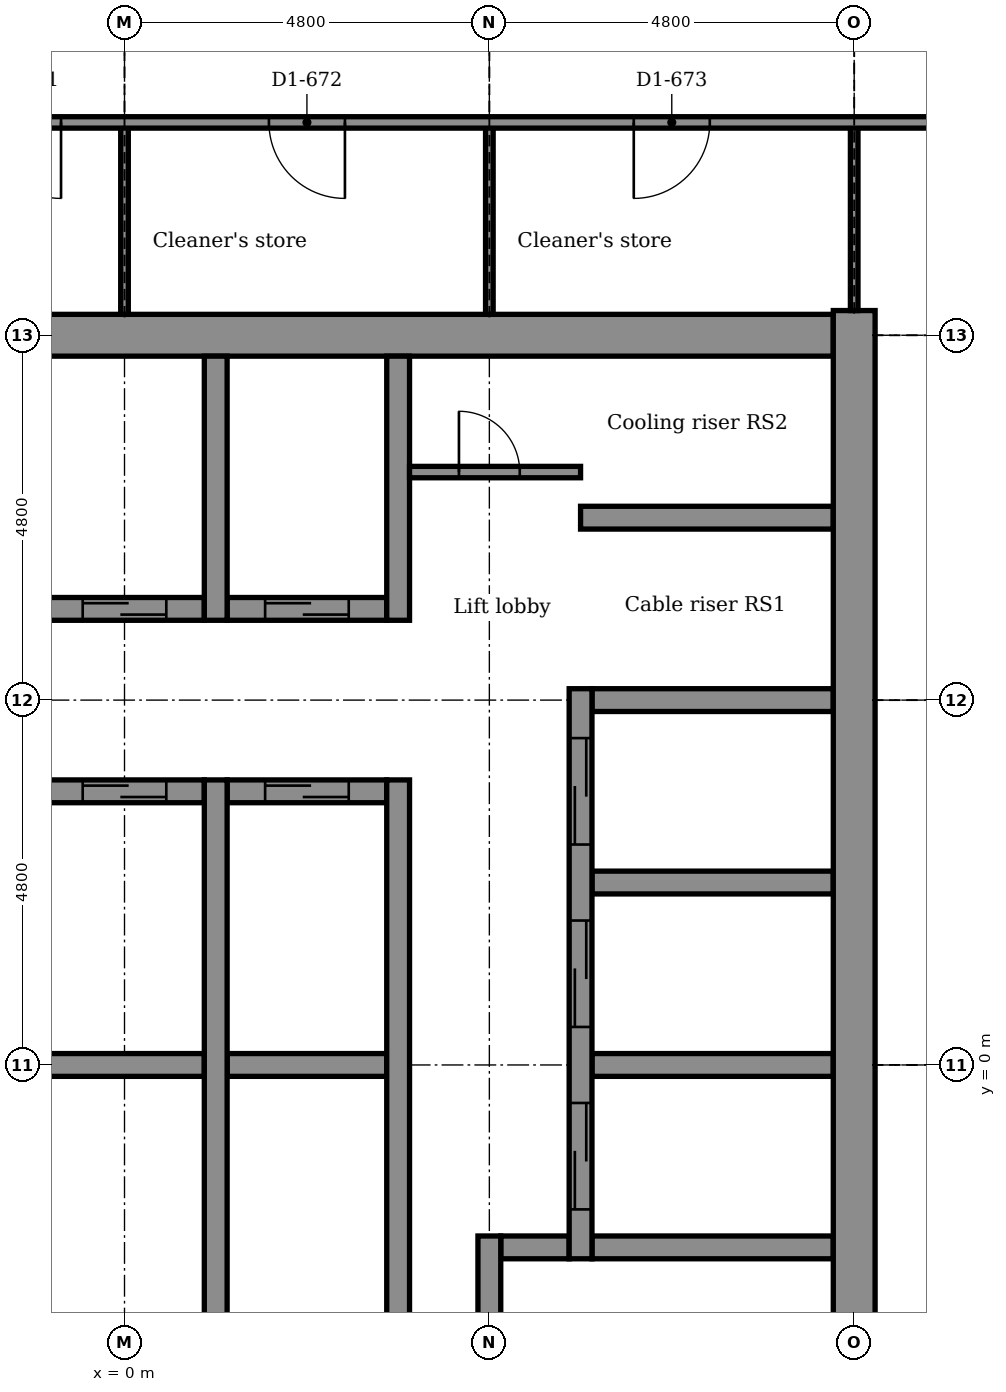
"""IFC4 building model, lengths in metres.
Left out: names, types, materials, properties, quantities, classifications, styles, units other than length and angle.
Written with IfcOpenShell. Run it as: python <this file> out.ifc"""

import sys

from ifc_helpers import new_model, si_unit, direction, frame, frame_2d, origin, place, context, subcontext, project, spatial, rectangle, extrude, element, fill, save


model = new_model("IFC4")
c1 = context("Model", 3, precision=1e-05, world=origin(), true_north=direction((0.0, 1.0)))
c2 = subcontext(c1, "Body", "Model", "MODEL_VIEW")
j1 = project(units=[si_unit("LENGTHUNIT", "METRE"), si_unit("PLANEANGLEUNIT", "RADIAN")], contexts=[c1])
p1 = place(None, origin())
s1 = spatial("IfcSite", under=j1, at=p1, CompositionType="ELEMENT")
p2 = place(p1, origin())
s2 = spatial("IfcBuilding", under=s1, at=p2, CompositionType="ELEMENT")
p3 = place(p2, frame((0.0, 0.0, 242.3)))
s3 = spatial("IfcBuildingStorey", under=s2, at=p3, CompositionType="ELEMENT", Elevation=242.3)
p4 = place(p3, frame((4.95, -2.4, -0.15), z_axis=(0.0, 0.0, 1.0), x_axis=(1.0, 0.0, 0.0)))
e1 = element("IfcWall", 1, at=p4, inside=s3, PredefinedType="STANDARD", context=c2, shape_type="SweptSolid", body=[
    extrude(rectangle(XDim=0.9, YDim=0.3, at=frame_2d((0.45, 0.0))), origin(), (0.0, 0.0, 1.0), 3.9),
])
p5 = place(p3, frame((6.15, -2.4, -0.15), z_axis=(0.0, 0.0, 1.0), x_axis=(1.0, 0.0, 0.0)))
e2 = element("IfcWall", 2, at=p5, inside=s3, PredefinedType="STANDARD", context=c2, shape_type="SweptSolid", body=[
    extrude(rectangle(XDim=3.175, YDim=0.3, at=frame_2d((1.587, 0.0))), origin(), (0.0, 0.0, 1.0), 3.9),
])
p6 = place(p3, frame((-1.05, 0.0, -0.15), z_axis=(0.0, 0.0, 1.0), x_axis=(1.0, 0.0, 0.0)))
e3 = element("IfcWall", 3, at=p6, inside=s3, PredefinedType="STANDARD", context=c2, shape_type="SweptSolid", body=[
    extrude(rectangle(XDim=2.1, YDim=0.3, at=frame_2d((1.05, 0.0))), origin(), (0.0, 0.0, 1.0), 3.9),
])
p7 = place(p3, frame((1.35, 0.0, -0.15), z_axis=(0.0, 0.0, 1.0), x_axis=(1.0, 0.0, 0.0)))
e4 = element("IfcWall", 4, at=p7, inside=s3, PredefinedType="STANDARD", context=c2, shape_type="SweptSolid", body=[
    extrude(rectangle(XDim=2.1, YDim=0.3, at=frame_2d((1.05, 0.0))), origin(), (0.0, 0.0, 1.0), 3.9),
])
for number, where, z_axis, x_axis in (
    (5, (6.15, 0.0, -0.15), (0.0, 0.0, 1.0), (1.0, 0.0, 0.0)),
    (6, (6.15, 2.4, -0.15), (0.0, 0.0, 1.0), (1.0, 0.0, 0.0)),
):
    element("IfcWall", number, at=place(p3, frame(where, z_axis=z_axis, x_axis=x_axis)), inside=s3, PredefinedType="STANDARD", context=c2, shape_type="SweptSolid", body=[
        extrude(rectangle(XDim=3.175, YDim=0.3, at=frame_2d((1.587, 0.0))), origin(), (0.0, 0.0, 1.0), 3.9),
    ])
p8 = place(p3, frame((-1.05, 3.6, -0.15), z_axis=(0.0, 0.0, 1.0), x_axis=(1.0, 0.0, 0.0)))
e7 = element("IfcWall", 7, at=p8, inside=s3, PredefinedType="STANDARD", context=c2, shape_type="SweptSolid", body=[
    extrude(rectangle(XDim=2.1, YDim=0.3, at=frame_2d((1.05, 0.0))), origin(), (0.0, 0.0, 1.0), 3.9),
])
p9 = place(p8, frame((0.5, 0.0, 0.15)))
e8 = element("IfcOpeningElement", 8, at=p9, cuts=e7, PredefinedType="OPENING", context=c2, shape_type="SweptSolid", body=[
    extrude(rectangle(XDim=1.1, YDim=2.1, at=frame_2d((0.55, 1.05))), frame((0.0, 0.16, 0.0), z_axis=(0.0, -1.0, 0.0), x_axis=(1.0, 0.0, 0.0)), (0.0, 0.0, 1.0), 0.32),
])
p10 = place(p3, frame((1.35, 3.6, -0.15), z_axis=(0.0, 0.0, 1.0), x_axis=(1.0, 0.0, 0.0)))
e9 = element("IfcWall", 9, at=p10, inside=s3, PredefinedType="STANDARD", context=c2, shape_type="SweptSolid", body=[
    extrude(rectangle(XDim=2.1, YDim=0.3, at=frame_2d((1.05, 0.0))), origin(), (0.0, 0.0, 1.0), 3.9),
])
p11 = place(p10, frame((0.5, 0.0, 0.15)))
e10 = element("IfcOpeningElement", 10, at=p11, cuts=e9, PredefinedType="OPENING", context=c2, shape_type="SweptSolid", body=[
    extrude(rectangle(XDim=1.1, YDim=2.1, at=frame_2d((0.55, 1.05))), frame((0.0, 0.16, 0.0), z_axis=(0.0, -1.0, 0.0), x_axis=(1.0, 0.0, 0.0)), (0.0, 0.0, 1.0), 0.32),
])
p12 = place(p3, frame((6.15, 4.8, -0.15), z_axis=(0.0, 0.0, 1.0), x_axis=(1.0, 0.0, 0.0)))
e11 = element("IfcWall", 11, at=p12, inside=s3, PredefinedType="STANDARD", context=c2, shape_type="SweptSolid", body=[
    extrude(rectangle(XDim=3.175, YDim=0.3, at=frame_2d((1.587, 0.0))), origin(), (0.0, 0.0, 1.0), 3.9),
])
p13 = place(p3, frame((-1.05, 6.0, -0.15), z_axis=(0.0, 0.0, 1.0), x_axis=(1.0, 0.0, 0.0)))
e12 = element("IfcWall", 12, at=p13, inside=s3, PredefinedType="STANDARD", context=c2, shape_type="SweptSolid", body=[
    extrude(rectangle(XDim=2.1, YDim=0.3, at=frame_2d((1.05, 0.0))), origin(), (0.0, 0.0, 1.0), 3.9),
])
p14 = place(p13, frame((0.5, 0.0, 0.15)))
e13 = element("IfcOpeningElement", 13, at=p14, cuts=e12, PredefinedType="OPENING", context=c2, shape_type="SweptSolid", body=[
    extrude(rectangle(XDim=1.1, YDim=2.1, at=frame_2d((0.55, 1.05))), frame((0.0, 0.16, 0.0), z_axis=(0.0, -1.0, 0.0), x_axis=(1.0, 0.0, 0.0)), (0.0, 0.0, 1.0), 0.32),
])
p15 = place(p3, frame((1.35, 6.0, -0.15), z_axis=(0.0, 0.0, 1.0), x_axis=(1.0, 0.0, 0.0)))
e14 = element("IfcWall", 14, at=p15, inside=s3, PredefinedType="STANDARD", context=c2, shape_type="SweptSolid", body=[
    extrude(rectangle(XDim=2.1, YDim=0.3, at=frame_2d((1.05, 0.0))), origin(), (0.0, 0.0, 1.0), 3.9),
])
p16 = place(p15, frame((0.5, 0.0, 0.15)))
e15 = element("IfcOpeningElement", 15, at=p16, cuts=e14, PredefinedType="OPENING", context=c2, shape_type="SweptSolid", body=[
    extrude(rectangle(XDim=1.1, YDim=2.1, at=frame_2d((0.55, 1.05))), frame((0.0, 0.16, 0.0), z_axis=(0.0, -1.0, 0.0), x_axis=(1.0, 0.0, 0.0)), (0.0, 0.0, 1.0), 0.32),
])
p17 = place(p3, frame((6.0, 7.2, -0.15), z_axis=(0.0, 0.0, 1.0), x_axis=(1.0, 0.0, 0.0)))
e16 = element("IfcWall", 16, at=p17, inside=s3, PredefinedType="STANDARD", context=c2, shape_type="SweptSolid", body=[
    extrude(rectangle(XDim=3.325, YDim=0.3, at=frame_2d((1.663, 0.0))), origin(), (0.0, 0.0, 1.0), 3.9),
])
p18 = place(p3, frame((-5.25, 9.6, -0.15), z_axis=(0.0, 0.0, 1.0), x_axis=(1.0, 0.0, 0.0)))
e17 = element("IfcWall", 17, at=p18, inside=s3, PredefinedType="SHEAR", context=c2, shape_type="SweptSolid", body=[
    extrude(rectangle(XDim=14.575, YDim=0.55, at=frame_2d((7.288, 0.0))), origin(), (0.0, 0.0, 1.0), 3.9),
])
p19 = place(p18, frame((0.6, 0.0, 0.15)))
e18 = element("IfcOpeningElement", 18, at=p19, cuts=e17, PredefinedType="OPENING", context=c2, shape_type="SweptSolid", body=[
    extrude(rectangle(XDim=0.9, YDim=2.1, at=frame_2d((0.45, 1.05))), frame((0.0, 0.285, 0.0), z_axis=(0.0, -1.0, 0.0), x_axis=(1.0, 0.0, 0.0)), (0.0, 0.0, 1.0), 0.57),
])
p20 = place(p3, frame((1.2, -3.75, -0.15), z_axis=(0.0, 0.0, 1.0), x_axis=(0.0, 1.0, 0.0)))
e19 = element("IfcWall", 19, at=p20, inside=s3, PredefinedType="STANDARD", context=c2, shape_type="SweptSolid", body=[
    extrude(rectangle(XDim=7.5, YDim=0.3, at=frame_2d((3.75, 0.0))), origin(), (0.0, 0.0, 1.0), 3.9),
])
p21 = place(p3, frame((1.2, 5.85, -0.15), z_axis=(0.0, 0.0, 1.0), x_axis=(0.0, 1.0, 0.0)))
e20 = element("IfcWall", 20, at=p21, inside=s3, PredefinedType="STANDARD", context=c2, shape_type="SweptSolid", body=[
    extrude(rectangle(XDim=3.475, YDim=0.3, at=frame_2d((1.737, 0.0))), origin(), (0.0, 0.0, 1.0), 3.9),
])
p22 = place(p3, frame((3.6, -3.75, -0.15), z_axis=(0.0, 0.0, 1.0), x_axis=(0.0, 1.0, 0.0)))
e21 = element("IfcWall", 21, at=p22, inside=s3, PredefinedType="STANDARD", context=c2, shape_type="SweptSolid", body=[
    extrude(rectangle(XDim=7.5, YDim=0.3, at=frame_2d((3.75, 0.0))), origin(), (0.0, 0.0, 1.0), 3.9),
])
p23 = place(p3, frame((3.6, 5.85, -0.15), z_axis=(0.0, 0.0, 1.0), x_axis=(0.0, 1.0, 0.0)))
e22 = element("IfcWall", 22, at=p23, inside=s3, PredefinedType="STANDARD", context=c2, shape_type="SweptSolid", body=[
    extrude(rectangle(XDim=3.475, YDim=0.3, at=frame_2d((1.737, 0.0))), origin(), (0.0, 0.0, 1.0), 3.9),
])
p24 = place(p3, frame((4.8, -9.325, -0.15), z_axis=(0.0, 0.0, 1.0), x_axis=(0.0, 1.0, 0.0)))
e23 = element("IfcWall", 23, at=p24, inside=s3, PredefinedType="STANDARD", context=c2, shape_type="SweptSolid", body=[
    extrude(rectangle(XDim=7.075, YDim=0.3, at=frame_2d((3.538, 0.0))), origin(), (0.0, 0.0, 1.0), 3.9),
])
p25 = place(p24, frame((3.875, 0.0, 0.15)))
e24 = element("IfcOpeningElement", 24, at=p25, cuts=e23, PredefinedType="OPENING", context=c2, shape_type="SweptSolid", body=[
    extrude(rectangle(XDim=1.2, YDim=2.1, at=frame_2d((0.6, 1.05))), frame((0.0, 0.16, 0.0), z_axis=(0.0, -1.0, 0.0), x_axis=(1.0, 0.0, 0.0)), (0.0, 0.0, 1.0), 0.32),
])
p26 = place(p3, frame((6.0, -2.55, -0.15), z_axis=(0.0, 0.0, 1.0), x_axis=(0.0, 1.0, 0.0)))
e25 = element("IfcWall", 25, at=p26, inside=s3, PredefinedType="STANDARD", context=c2, shape_type="SweptSolid", body=[
    extrude(rectangle(XDim=7.5, YDim=0.3, at=frame_2d((3.75, 0.0))), origin(), (0.0, 0.0, 1.0), 3.9),
])
p27 = place(p26, frame((0.65, 0.0, 0.15)))
e26 = element("IfcOpeningElement", 26, at=p27, cuts=e25, PredefinedType="OPENING", context=c2, shape_type="SweptSolid", body=[
    extrude(rectangle(XDim=1.4, YDim=2.1, at=frame_2d((0.7, 1.05))), frame((0.0, 0.16, 0.0), z_axis=(0.0, -1.0, 0.0), x_axis=(1.0, 0.0, 0.0)), (0.0, 0.0, 1.0), 0.32),
])
p28 = place(p26, frame((3.05, 0.0, 0.15)))
e27 = element("IfcOpeningElement", 27, at=p28, cuts=e25, PredefinedType="OPENING", context=c2, shape_type="SweptSolid", body=[
    extrude(rectangle(XDim=1.4, YDim=2.1, at=frame_2d((0.7, 1.05))), frame((0.0, 0.16, 0.0), z_axis=(0.0, -1.0, 0.0), x_axis=(1.0, 0.0, 0.0)), (0.0, 0.0, 1.0), 0.32),
])
p29 = place(p26, frame((5.45, 0.0, 0.15)))
e28 = element("IfcOpeningElement", 28, at=p29, cuts=e25, PredefinedType="OPENING", context=c2, shape_type="SweptSolid", body=[
    extrude(rectangle(XDim=1.4, YDim=2.1, at=frame_2d((0.7, 1.05))), frame((0.0, 0.16, 0.0), z_axis=(0.0, -1.0, 0.0), x_axis=(1.0, 0.0, 0.0)), (0.0, 0.0, 1.0), 0.32),
])
p30 = place(p3, frame((9.6, -10.15, -0.15), z_axis=(0.0, 0.0, 1.0), x_axis=(0.0, 1.0, 0.0)))
e29 = element("IfcWall", 29, at=p30, inside=s3, PredefinedType="SHEAR", context=c2, shape_type="SweptSolid", body=[
    extrude(rectangle(XDim=20.075, YDim=0.55, at=frame_2d((10.038, 0.0))), origin(), (0.0, 0.0, 1.0), 3.9),
])
p31 = place(p3, frame((9.6, 9.925, 0.0), z_axis=(0.0, 0.0, 1.0), x_axis=(0.0, 1.0, 0.0)))
e30 = element("IfcWall", 30, at=p31, inside=s3, PredefinedType="PARTITIONING", context=c2, shape_type="SweptSolid", body=[
    extrude(rectangle(XDim=2.475, YDim=0.1, at=frame_2d((1.237, 0.0))), origin(), (0.0, 0.0, 1.0), 3.217),
])
for number, where, z_axis, x_axis in (
    (31, (4.8, 9.875, 0.0), (0.0, 0.0, 1.0), (0.0, 1.0, 0.0)),
    (32, (0.0, 9.875, 0.0), (0.0, 0.0, 1.0), (0.0, 1.0, 0.0)),
):
    element("IfcWall", number, at=place(p3, frame(where, z_axis=z_axis, x_axis=x_axis)), inside=s3, PredefinedType="PARTITIONING", context=c2, shape_type="SweptSolid", body=[
        extrude(rectangle(XDim=2.525, YDim=0.1, at=frame_2d((1.262, 0.0))), origin(), (0.0, 0.0, 1.0), 3.217),
    ])
p32 = place(p3, frame((3.75, 7.8, 0.0), z_axis=(0.0, 0.0, 1.0), x_axis=(1.0, 0.0, 0.0)))
e33 = element("IfcWall", 33, at=p32, inside=s3, PredefinedType="PARTITIONING", context=c2, shape_type="SweptSolid", body=[
    extrude(rectangle(XDim=2.25, YDim=0.15, at=frame_2d((1.125, 0.0))), origin(), (0.0, 0.0, 1.0), 3.75),
])
p33 = place(p32, frame((0.65, 0.0, 0.0)))
e34 = element("IfcOpeningElement", 34, at=p33, cuts=e33, PredefinedType="OPENING", context=c2, shape_type="SweptSolid", body=[
    extrude(rectangle(XDim=0.8, YDim=2.1, at=frame_2d((0.4, 1.05))), frame((0.0, 0.085, 0.0), z_axis=(0.0, -1.0, 0.0), x_axis=(1.0, 0.0, 0.0)), (0.0, 0.0, 1.0), 0.17),
])
p34 = place(p3, frame((-3.0, 12.4, 0.0), z_axis=(0.0, 0.0, 1.0), x_axis=(1.0, 0.0, 0.0)))
e35 = element("IfcWall", 35, at=p34, inside=s3, PredefinedType="PARTITIONING", context=c2, shape_type="SweptSolid", body=[
    extrude(rectangle(XDim=17.97, YDim=0.15, at=frame_2d((8.985, 0.0))), origin(), (0.0, 0.0, 1.0), 3.75),
])
p35 = place(p34, frame((1.165, 0.0, 0.0)))
e36 = element("IfcOpeningElement", 36, at=p35, cuts=e35, PredefinedType="OPENING", context=c2, shape_type="SweptSolid", body=[
    extrude(rectangle(XDim=1.0, YDim=2.1, at=frame_2d((0.5, 1.05))), frame((0.0, 0.085, 0.0), z_axis=(0.0, -1.0, 0.0), x_axis=(1.0, 0.0, 0.0)), (0.0, 0.0, 1.0), 0.17),
])
p36 = place(p34, frame((4.9, 0.0, 0.0)))
e37 = element("IfcOpeningElement", 37, at=p36, cuts=e35, PredefinedType="OPENING", context=c2, shape_type="SweptSolid", body=[
    extrude(rectangle(XDim=1.0, YDim=2.1, at=frame_2d((0.5, 1.05))), frame((0.0, 0.085, 0.0), z_axis=(0.0, -1.0, 0.0), x_axis=(1.0, 0.0, 0.0)), (0.0, 0.0, 1.0), 0.17),
])
p37 = place(p34, frame((9.7, 0.0, 0.0)))
e38 = element("IfcOpeningElement", 38, at=p37, cuts=e35, PredefinedType="OPENING", context=c2, shape_type="SweptSolid", body=[
    extrude(rectangle(XDim=1.0, YDim=2.1, at=frame_2d((0.5, 1.05))), frame((0.0, 0.085, 0.0), z_axis=(0.0, -1.0, 0.0), x_axis=(1.0, 0.0, 0.0)), (0.0, 0.0, 1.0), 0.17),
])
p38 = place(p34, frame((15.232, 0.0, 0.0)))
e39 = element("IfcOpeningElement", 39, at=p38, cuts=e35, PredefinedType="OPENING", context=c2, shape_type="SweptSolid", body=[
    extrude(rectangle(XDim=1.8, YDim=2.1, at=frame_2d((0.9, 1.05))), frame((0.0, 0.085, 0.0), z_axis=(0.0, -1.0, 0.0), x_axis=(1.0, 0.0, 0.0)), (0.0, 0.0, 1.0), 0.17),
])
p39 = place(p33, origin())
e40 = element("IfcDoor", 40, at=p39, inside=s3, OperationType="SINGLE_SWING_LEFT", PredefinedType="DOOR", context=c2, shape_type="SweptSolid", body=[
    extrude(rectangle(XDim=0.8, YDim=2.1, at=frame_2d((0.4, 1.05))), frame((0.0, 0.025, 0.0), z_axis=(0.0, -1.0, 0.0), x_axis=(1.0, 0.0, 0.0)), (0.0, 0.0, 1.0), 0.05),
])
fill(e34, e40)
p40 = place(p35, frame((1.0, 0.0, 0.0), z_axis=(0.0, 0.0, 1.0), x_axis=(-1.0, 0.0, 0.0)))
e41 = element("IfcDoor", 41, at=p40, inside=s3, OperationType="SINGLE_SWING_RIGHT", PredefinedType="DOOR", context=c2, shape_type="SweptSolid", body=[
    extrude(rectangle(XDim=1.0, YDim=2.1, at=frame_2d((0.5, 1.05))), frame((0.0, 0.025, 0.0), z_axis=(0.0, -1.0, 0.0), x_axis=(1.0, 0.0, 0.0)), (0.0, 0.0, 1.0), 0.05),
])
fill(e36, e41)
p41 = place(p36, frame((1.0, 0.0, 0.0), z_axis=(0.0, 0.0, 1.0), x_axis=(-1.0, 0.0, 0.0)))
e42 = element("IfcDoor", 42, at=p41, inside=s3, OperationType="SINGLE_SWING_RIGHT", PredefinedType="DOOR", context=c2, shape_type="SweptSolid", body=[
    extrude(rectangle(XDim=1.0, YDim=2.1, at=frame_2d((0.5, 1.05))), frame((0.0, 0.025, 0.0), z_axis=(0.0, -1.0, 0.0), x_axis=(1.0, 0.0, 0.0)), (0.0, 0.0, 1.0), 0.05),
])
fill(e37, e42)
p42 = place(p37, frame((1.0, 0.0, 0.0), z_axis=(0.0, 0.0, 1.0), x_axis=(-1.0, 0.0, 0.0)))
e43 = element("IfcDoor", 43, at=p42, inside=s3, OperationType="SINGLE_SWING_LEFT", PredefinedType="DOOR", context=c2, shape_type="SweptSolid", body=[
    extrude(rectangle(XDim=1.0, YDim=2.1, at=frame_2d((0.5, 1.05))), frame((0.0, 0.025, 0.0), z_axis=(0.0, -1.0, 0.0), x_axis=(1.0, 0.0, 0.0)), (0.0, 0.0, 1.0), 0.05),
])
fill(e38, e43)
p43 = place(p27, origin())
e44 = element("IfcDoor", 44, at=p43, inside=s3, OperationType="DOUBLE_DOOR_SLIDING", PredefinedType="DOOR", context=c2, shape_type="SweptSolid", body=[
    extrude(rectangle(XDim=1.4, YDim=2.1, at=frame_2d((0.7, 1.05))), frame((0.0, 0.025, 0.0), z_axis=(0.0, -1.0, 0.0), x_axis=(1.0, 0.0, 0.0)), (0.0, 0.0, 1.0), 0.05),
])
fill(e26, e44)
p44 = place(p28, origin())
e45 = element("IfcDoor", 45, at=p44, inside=s3, OperationType="DOUBLE_DOOR_SLIDING", PredefinedType="DOOR", context=c2, shape_type="SweptSolid", body=[
    extrude(rectangle(XDim=1.4, YDim=2.1, at=frame_2d((0.7, 1.05))), frame((0.0, 0.025, 0.0), z_axis=(0.0, -1.0, 0.0), x_axis=(1.0, 0.0, 0.0)), (0.0, 0.0, 1.0), 0.05),
])
fill(e27, e45)
p45 = place(p29, origin())
e46 = element("IfcDoor", 46, at=p45, inside=s3, OperationType="DOUBLE_DOOR_SLIDING", PredefinedType="DOOR", context=c2, shape_type="SweptSolid", body=[
    extrude(rectangle(XDim=1.4, YDim=2.1, at=frame_2d((0.7, 1.05))), frame((0.0, 0.025, 0.0), z_axis=(0.0, -1.0, 0.0), x_axis=(1.0, 0.0, 0.0)), (0.0, 0.0, 1.0), 0.05),
])
fill(e28, e46)
p46 = place(p14, origin())
e47 = element("IfcDoor", 47, at=p46, inside=s3, OperationType="DOUBLE_DOOR_SLIDING", PredefinedType="DOOR", context=c2, shape_type="SweptSolid", body=[
    extrude(rectangle(XDim=1.1, YDim=2.1, at=frame_2d((0.55, 1.05))), frame((0.0, 0.025, 0.0), z_axis=(0.0, -1.0, 0.0), x_axis=(1.0, 0.0, 0.0)), (0.0, 0.0, 1.0), 0.05),
])
fill(e13, e47)
p47 = place(p16, origin())
e48 = element("IfcDoor", 48, at=p47, inside=s3, OperationType="DOUBLE_DOOR_SLIDING", PredefinedType="DOOR", context=c2, shape_type="SweptSolid", body=[
    extrude(rectangle(XDim=1.1, YDim=2.1, at=frame_2d((0.55, 1.05))), frame((0.0, 0.025, 0.0), z_axis=(0.0, -1.0, 0.0), x_axis=(1.0, 0.0, 0.0)), (0.0, 0.0, 1.0), 0.05),
])
fill(e15, e48)
p48 = place(p9, origin())
e49 = element("IfcDoor", 49, at=p48, inside=s3, OperationType="DOUBLE_DOOR_SLIDING", PredefinedType="DOOR", context=c2, shape_type="SweptSolid", body=[
    extrude(rectangle(XDim=1.1, YDim=2.1, at=frame_2d((0.55, 1.05))), frame((0.0, 0.025, 0.0), z_axis=(0.0, -1.0, 0.0), x_axis=(1.0, 0.0, 0.0)), (0.0, 0.0, 1.0), 0.05),
])
fill(e8, e49)
p49 = place(p11, origin())
e50 = element("IfcDoor", 50, at=p49, inside=s3, OperationType="DOUBLE_DOOR_SLIDING", PredefinedType="DOOR", context=c2, shape_type="SweptSolid", body=[
    extrude(rectangle(XDim=1.1, YDim=2.1, at=frame_2d((0.55, 1.05))), frame((0.0, 0.025, 0.0), z_axis=(0.0, -1.0, 0.0), x_axis=(1.0, 0.0, 0.0)), (0.0, 0.0, 1.0), 0.05),
])
fill(e10, e50)
save(model, sys.argv[1])
